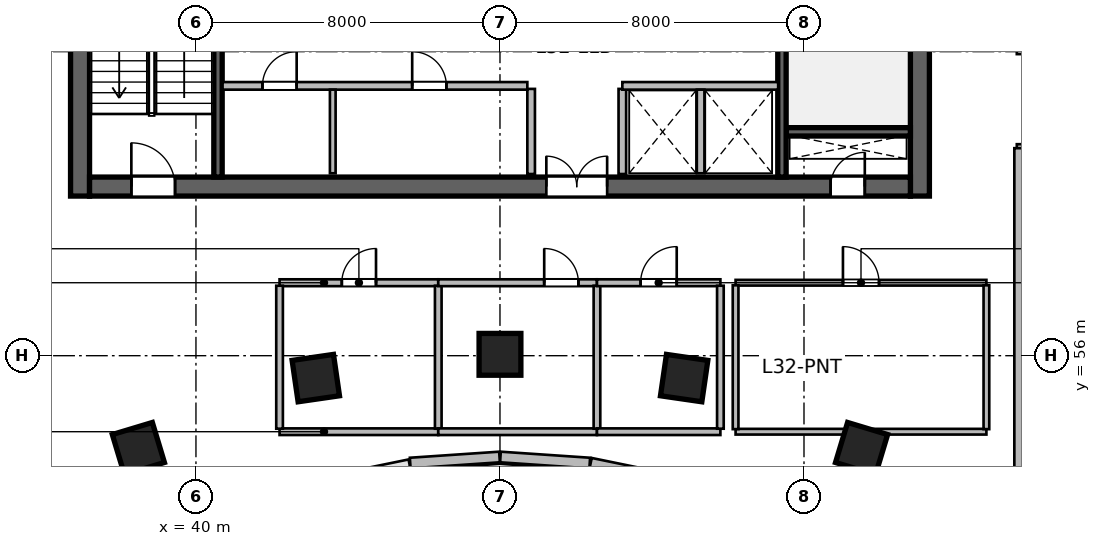
"""IFC4 building model, lengths in metres.
Left out: names, types, materials, properties, quantities, classifications, styles, units other than length and angle.
Written with IfcOpenShell. Run it as: python <this file> out.ifc"""

import sys

from ifc_helpers import new_model, si_unit, direction, frame, frame_2d, origin, origin_2d, place, context, subcontext, project, spatial, rectangle, extrude, source, transform, mapped, element, fill, save


model = new_model("IFC4")
c1 = context("Model", 3, precision=1e-05, world=origin(), true_north=direction((0.0, 1.0)))
c2 = subcontext(c1, "Body", "Model", "MODEL_VIEW")
j1 = project(units=[si_unit("LENGTHUNIT", "METRE"), si_unit("PLANEANGLEUNIT", "RADIAN")], contexts=[c1])
p1 = place(None, origin())
s1 = spatial("IfcSite", under=j1, at=p1, CompositionType="ELEMENT")
p2 = place(p1, origin())
s2 = spatial("IfcBuilding", under=s1, at=p2, CompositionType="ELEMENT")
p3 = place(p2, frame((0.0, 0.0, 135.0)))
s3 = spatial("IfcBuildingStorey", under=s2, at=p3, CompositionType="ELEMENT", Elevation=135.0)
m1 = source(origin(), c2, "Body", "SweptSolid", [
    extrude(rectangle(XDim=12.0, YDim=0.5, at=frame_2d((6.0, 0.0))), origin(), (0.0, 0.0, 1.0), 3.9),
])
for number, where, z_axis, x_axis in (
    (1, (36.95, 60.2, 0.0), (0.0, 0.0, 1.0), (0.0, 1.0, 0.0)),
    (2, (59.05, 60.2, 0.0), (0.0, 0.0, 1.0), (0.0, 1.0, 0.0)),
):
    element("IfcWall", number, at=place(p3, frame(where, z_axis=z_axis, x_axis=x_axis)), inside=s3, PredefinedType="SHEAR", context=c2, shape_type="MappedRepresentation", body=[
        mapped(m1, transform((0.0, 0.0, 0.0), scale=1.0)),
    ])
m2 = source(origin(), c2, "Body", "SweptSolid", [
    extrude(rectangle(XDim=21.6, YDim=0.5, at=frame_2d((10.8, 0.0))), origin(), (0.0, 0.0, 1.0), 3.9),
])
p4 = place(p3, frame((37.2, 60.45, 0.0), z_axis=(0.0, 0.0, 1.0), x_axis=(1.0, 0.0, 0.0)))
e3 = element("IfcWall", 3, at=p4, inside=s3, PredefinedType="SHEAR", context=c2, shape_type="MappedRepresentation", body=[
    mapped(m2, transform((0.0, 0.0, 0.0), scale=1.0)),
])
p5 = place(p4, frame((1.1, 0.0, 0.0)))
e4 = element("IfcOpeningElement", 4, at=p5, cuts=e3, PredefinedType="OPENING", context=c2, shape_type="SweptSolid", body=[
    extrude(rectangle(XDim=1.15, YDim=2.15, at=frame_2d((0.575, 1.075))), frame((0.0, 0.26, 0.0), z_axis=(0.0, -1.0, 0.0), x_axis=(1.0, 0.0, 0.0)), (0.0, 0.0, 1.0), 0.52),
])
p6 = place(p4, frame((19.5, 0.0, 0.0)))
e5 = element("IfcOpeningElement", 5, at=p6, cuts=e3, PredefinedType="OPENING", context=c2, shape_type="SweptSolid", body=[
    extrude(rectangle(XDim=0.9, YDim=2.1, at=frame_2d((0.45, 1.05))), frame((0.0, 0.26, 0.0), z_axis=(0.0, -1.0, 0.0), x_axis=(1.0, 0.0, 0.0)), (0.0, 0.0, 1.0), 0.52),
])
p7 = place(p4, frame((12.02, 0.0, 0.0)))
e6 = element("IfcOpeningElement", 6, at=p7, cuts=e3, PredefinedType="OPENING", context=c2, shape_type="SweptSolid", body=[
    extrude(rectangle(XDim=1.6, YDim=2.15, at=frame_2d((0.8, 1.075))), frame((0.0, 0.26, 0.0), z_axis=(0.0, -1.0, 0.0), x_axis=(1.0, 0.0, 0.0)), (0.0, 0.0, 1.0), 0.52),
])
m3 = source(origin(), c2, "Body", "SweptSolid", [
    extrude(rectangle(XDim=3.27, YDim=0.22, at=frame_2d((1.635, 0.0))), origin(), (0.0, 0.0, 1.0), 3.9),
])
p8 = place(p3, frame((55.53, 61.89, 0.0), z_axis=(0.0, 0.0, 1.0), x_axis=(1.0, 0.0, 0.0)))
e7 = element("IfcWall", 7, at=p8, inside=s3, PredefinedType="SHEAR", context=c2, shape_type="MappedRepresentation", body=[
    mapped(m3, transform((0.0, 0.0, 0.0), scale=1.0)),
])
m4 = source(origin(), c2, "Body", "SweptSolid", [
    extrude(rectangle(XDim=11.0, YDim=0.22, at=frame_2d((5.5, 0.0))), origin(), (0.0, 0.0, 1.0), 3.9),
])
p9 = place(p3, frame((40.58, 60.7, 0.0), z_axis=(0.0, 0.0, 1.0), x_axis=(0.0, 1.0, 0.0)))
e8 = element("IfcWall", 8, at=p9, inside=s3, PredefinedType="SHEAR", context=c2, shape_type="MappedRepresentation", body=[
    mapped(m4, transform((0.0, 0.0, 0.0), scale=1.0)),
])
p10 = place(p3, frame((55.42, 60.7, 0.0), z_axis=(0.0, 0.0, 1.0), x_axis=(0.0, 1.0, 0.0)))
e9 = element("IfcWall", 9, at=p10, inside=s3, PredefinedType="SHEAR", context=c2, shape_type="MappedRepresentation", body=[
    mapped(m4, transform((0.0, 0.0, 0.0), scale=1.0)),
])
p11 = place(p10, frame((9.545, 0.0, 0.0)))
e10 = element("IfcOpeningElement", 10, at=p11, cuts=e9, PredefinedType="OPENING", context=c2, shape_type="SweptSolid", body=[
    extrude(rectangle(XDim=1.15, YDim=2.15, at=frame_2d((0.575, 1.075))), frame((0.0, 0.12, 0.0), z_axis=(0.0, -1.0, 0.0), x_axis=(1.0, 0.0, 0.0)), (0.0, 0.0, 1.0), 0.24),
])
m5 = source(origin(), c2, "Body", "SweptSolid", [
    extrude(rectangle(XDim=1.1, YDim=1.1, at=origin_2d()), origin(), (0.0, 0.0, 1.0), 3.9),
])
for number, where, z_axis, x_axis in (
    (11, (38.485, 53.558, 0.0), (0.0, 0.0, 1.0), (-0.289, 0.957, 0.0)),
    (12, (43.154, 55.411, 0.0), (0.0, 0.0, 1.0), (-0.143, 0.99, 0.0)),
    (13, (48.0, 56.036, 0.0), (0.0, 0.0, 1.0), (0.0, 1.0, 0.0)),
    (14, (52.846, 55.411, 0.0), (0.0, 0.0, 1.0), (0.143, 0.99, 0.0)),
    (15, (57.515, 53.558, 0.0), (0.0, 0.0, 1.0), (0.289, 0.957, 0.0)),
):
    element("IfcColumn", number, at=place(p3, frame(where, z_axis=z_axis, x_axis=x_axis)), inside=s3, PredefinedType="COLUMN", context=c2, shape_type="MappedRepresentation", body=[
        mapped(m5, transform((0.0, 0.0, 0.0), scale=1.0)),
    ])
m6 = source(origin(), c2, "Body", "SweptSolid", [
    extrude(rectangle(XDim=2.374, YDim=0.28, at=frame_2d((1.187, 0.0))), origin(), (0.0, 0.0, 1.0), 3.65),
])
p12 = place(p3, frame((52.711, 52.695, 0.0), z_axis=(0.0, 0.0, 1.0), x_axis=(-0.979619827472, 0.200860632341, 0.0)))
e16 = element("IfcWall", 16, at=p12, inside=s3, PredefinedType="SOLIDWALL", context=c2, shape_type="MappedRepresentation", body=[
    mapped(m6, transform((0.0, 0.0, 0.0), scale=1.0)),
])
m7 = source(origin(), c2, "Body", "SweptSolid", [
    extrude(rectangle(XDim=2.355, YDim=0.28, at=frame_2d((1.177, 0.0))), origin(), (0.0, 0.0, 1.0), 3.65),
])
for number, where, z_axis, x_axis in (
    (17, (50.362, 53.175, 0.0), (0.0, 0.0, 1.0), (-0.998, 0.068, 0.0)),
    (18, (47.988, 53.335, 0.0), (0.0, 0.0, 1.0), (-0.998, -0.068, 0.0)),
):
    element("IfcWall", number, at=place(p3, frame(where, z_axis=z_axis, x_axis=x_axis)), inside=s3, PredefinedType="SOLIDWALL", context=c2, shape_type="MappedRepresentation", body=[
        mapped(m7, transform((0.0, 0.0, 0.0), scale=1.0)),
    ])
m8 = source(origin(), c2, "Body", "SweptSolid", [
    extrude(rectangle(XDim=2.24, YDim=0.2, at=frame_2d((1.12, 0.0))), origin(), (0.0, 0.0, 1.0), 3.65),
])
for number, where, z_axis, x_axis in (
    (19, (48.82, 60.78, 0.0), (0.0, 0.0, 1.0), (0.0, 1.0, 0.0)),
    (20, (51.22, 60.78, 0.0), (0.0, 0.0, 1.0), (0.0, 1.0, 0.0)),
):
    element("IfcWall", number, at=place(p3, frame(where, z_axis=z_axis, x_axis=x_axis)), inside=s3, PredefinedType="SOLIDWALL", context=c2, shape_type="MappedRepresentation", body=[
        mapped(m8, transform((0.0, 0.0, 0.0), scale=1.0)),
    ])
m9 = source(origin(), c2, "Body", "SweptSolid", [
    extrude(rectangle(XDim=8.02, YDim=0.2, at=frame_2d((4.01, 0.0))), origin(), (0.0, 0.0, 1.0), 3.65),
])
p13 = place(p3, frame((40.7, 63.1, 0.0), z_axis=(0.0, 0.0, 1.0), x_axis=(1.0, 0.0, 0.0)))
e21 = element("IfcWall", 21, at=p13, inside=s3, PredefinedType="SOLIDWALL", context=c2, shape_type="MappedRepresentation", body=[
    mapped(m9, transform((0.0, 0.0, 0.0), scale=1.0)),
])
p14 = place(p13, frame((1.05, 0.0, 0.0)))
e22 = element("IfcOpeningElement", 22, at=p14, cuts=e21, PredefinedType="OPENING", context=c2, shape_type="SweptSolid", body=[
    extrude(rectangle(XDim=0.9, YDim=2.1, at=frame_2d((0.45, 1.05))), frame((0.0, 0.11, 0.0), z_axis=(0.0, -1.0, 0.0), x_axis=(1.0, 0.0, 0.0)), (0.0, 0.0, 1.0), 0.22),
])
p15 = place(p13, frame((4.99, 0.0, 0.0)))
e23 = element("IfcOpeningElement", 23, at=p15, cuts=e21, PredefinedType="OPENING", context=c2, shape_type="SweptSolid", body=[
    extrude(rectangle(XDim=0.9, YDim=2.1, at=frame_2d((0.45, 1.05))), frame((0.0, 0.11, 0.0), z_axis=(0.0, -1.0, 0.0), x_axis=(1.0, 0.0, 0.0)), (0.0, 0.0, 1.0), 0.22),
])
m10 = source(origin(), c2, "Body", "SweptSolid", [
    extrude(rectangle(XDim=4.1, YDim=0.2, at=frame_2d((2.05, 0.0))), origin(), (0.0, 0.0, 1.0), 3.65),
])
p16 = place(p3, frame((51.22, 63.1, 0.0), z_axis=(0.0, 0.0, 1.0), x_axis=(1.0, 0.0, 0.0)))
e24 = element("IfcWall", 24, at=p16, inside=s3, PredefinedType="SOLIDWALL", context=c2, shape_type="MappedRepresentation", body=[
    mapped(m10, transform((0.0, 0.0, 0.0), scale=1.0)),
])
m11 = source(origin(), c2, "Body", "SweptSolid", [
    extrude(rectangle(XDim=2.2, YDim=0.15, at=frame_2d((1.1, 0.0))), origin(), (0.0, 0.0, 1.0), 3.65),
])
p17 = place(p3, frame((43.6, 60.8, 0.0), z_axis=(0.0, 0.0, 1.0), x_axis=(0.0, 1.0, 0.0)))
e25 = element("IfcWall", 25, at=p17, inside=s3, PredefinedType="PARTITIONING", context=c2, shape_type="MappedRepresentation", body=[
    mapped(m11, transform((0.0, 0.0, 0.0), scale=1.0)),
])
m12 = source(origin(), c2, "Body", "SweptSolid", [
    extrude(rectangle(XDim=2.2, YDim=0.2, at=frame_2d((1.1, 0.0))), origin(), (0.0, 0.0, 1.0), 3.65),
])
p18 = place(p3, frame((53.28, 60.8, 0.0), z_axis=(0.0, 0.0, 1.0), x_axis=(0.0, 1.0, 0.0)))
e26 = element("IfcWall", 26, at=p18, inside=s3, PredefinedType="SOLIDWALL", context=c2, shape_type="MappedRepresentation", body=[
    mapped(m12, transform((0.0, 0.0, 0.0), scale=1.0)),
])
m13 = source(origin(), c2, "Body", "SweptSolid", [
    extrude(rectangle(XDim=4.176, YDim=0.175, at=frame_2d((2.088, 0.0))), origin(), (0.0, 0.0, 1.0), 3.65),
])
p19 = place(p3, frame((42.2, 54.0, 0.0), z_axis=(0.0, 0.0, 1.0), x_axis=(1.0, 0.0, 0.0)))
e27 = element("IfcWall", 27, at=p19, inside=s3, PredefinedType="PARTITIONING", context=c2, shape_type="MappedRepresentation", body=[
    mapped(m13, transform((0.0, 0.0, 0.0), scale=1.0)),
])
m14 = source(origin(), c2, "Body", "SweptSolid", [
    extrude(rectangle(XDim=4.176, YDim=0.18, at=frame_2d((2.088, 0.0))), origin(), (0.0, 0.0, 1.0), 3.65),
])
p20 = place(p3, frame((42.2, 57.92, 0.0), z_axis=(0.0, 0.0, 1.0), x_axis=(1.0, 0.0, 0.0)))
e28 = element("IfcWall", 28, at=p20, inside=s3, PredefinedType="PLUMBINGWALL", context=c2, shape_type="MappedRepresentation", body=[
    mapped(m14, transform((0.0, 0.0, 0.0), scale=1.0)),
])
p21 = place(p20, frame((1.638, 0.0, 0.0)))
e29 = element("IfcOpeningElement", 29, at=p21, cuts=e28, PredefinedType="OPENING", context=c2, shape_type="SweptSolid", body=[
    extrude(rectangle(XDim=0.9, YDim=2.08, at=frame_2d((0.45, 1.04))), frame((0.0, 0.1, 0.0), z_axis=(0.0, -1.0, 0.0), x_axis=(1.0, 0.0, 0.0)), (0.0, 0.0, 1.0), 0.2),
])
m15 = source(origin(), c2, "Body", "SweptSolid", [
    extrude(rectangle(XDim=3.763, YDim=0.175, at=frame_2d((1.881, 0.0))), origin(), (0.0, 0.0, 1.0), 3.65),
])
for number, where, z_axis, x_axis in (
    (30, (42.2, 54.079, 0.0), (0.0, 0.0, 1.0), (0.0, 1.0, 0.0)),
    (31, (46.376, 54.079, 0.0), (0.0, 0.0, 1.0), (0.0, 1.0, 0.0)),
):
    element("IfcWall", number, at=place(p3, frame(where, z_axis=z_axis, x_axis=x_axis)), inside=s3, PredefinedType="PARTITIONING", context=c2, shape_type="MappedRepresentation", body=[
        mapped(m15, transform((0.0, 0.0, 0.0), scale=1.0)),
    ])
p22 = place(p3, frame((46.376, 54.0, 0.0), z_axis=(0.0, 0.0, 1.0), x_axis=(1.0, 0.0, 0.0)))
e32 = element("IfcWall", 32, at=p22, inside=s3, PredefinedType="PARTITIONING", context=c2, shape_type="MappedRepresentation", body=[
    mapped(m13, transform((0.0, 0.0, 0.0), scale=1.0)),
])
p23 = place(p3, frame((46.376, 57.92, 0.0), z_axis=(0.0, 0.0, 1.0), x_axis=(1.0, 0.0, 0.0)))
e33 = element("IfcWall", 33, at=p23, inside=s3, PredefinedType="PLUMBINGWALL", context=c2, shape_type="MappedRepresentation", body=[
    mapped(m14, transform((0.0, 0.0, 0.0), scale=1.0)),
])
p24 = place(p23, frame((2.788, 0.0, 0.0)))
e34 = element("IfcOpeningElement", 34, at=p24, cuts=e33, PredefinedType="OPENING", context=c2, shape_type="SweptSolid", body=[
    extrude(rectangle(XDim=0.9, YDim=2.08, at=frame_2d((0.45, 1.04))), frame((0.0, 0.1, 0.0), z_axis=(0.0, -1.0, 0.0), x_axis=(1.0, 0.0, 0.0)), (0.0, 0.0, 1.0), 0.2),
])
p25 = place(p3, frame((50.552, 54.079, 0.0), z_axis=(0.0, 0.0, 1.0), x_axis=(0.0, 1.0, 0.0)))
e35 = element("IfcWall", 35, at=p25, inside=s3, PredefinedType="PARTITIONING", context=c2, shape_type="MappedRepresentation", body=[
    mapped(m15, transform((0.0, 0.0, 0.0), scale=1.0)),
])
m16 = source(origin(), c2, "Body", "SweptSolid", [
    extrude(rectangle(XDim=3.248, YDim=0.175, at=frame_2d((1.624, 0.0))), origin(), (0.0, 0.0, 1.0), 3.65),
])
p26 = place(p3, frame((50.552, 54.0, 0.0), z_axis=(0.0, 0.0, 1.0), x_axis=(1.0, 0.0, 0.0)))
e36 = element("IfcWall", 36, at=p26, inside=s3, PredefinedType="PARTITIONING", context=c2, shape_type="MappedRepresentation", body=[
    mapped(m16, transform((0.0, 0.0, 0.0), scale=1.0)),
])
m17 = source(origin(), c2, "Body", "SweptSolid", [
    extrude(rectangle(XDim=3.248, YDim=0.18, at=frame_2d((1.624, 0.0))), origin(), (0.0, 0.0, 1.0), 3.65),
])
p27 = place(p3, frame((50.552, 57.92, 0.0), z_axis=(0.0, 0.0, 1.0), x_axis=(1.0, 0.0, 0.0)))
e37 = element("IfcWall", 37, at=p27, inside=s3, PredefinedType="PLUMBINGWALL", context=c2, shape_type="MappedRepresentation", body=[
    mapped(m17, transform((0.0, 0.0, 0.0), scale=1.0)),
])
p28 = place(p27, frame((1.149, 0.0, 0.0)))
e38 = element("IfcOpeningElement", 38, at=p28, cuts=e37, PredefinedType="OPENING", context=c2, shape_type="SweptSolid", body=[
    extrude(rectangle(XDim=0.95, YDim=2.12, at=frame_2d((0.475, 1.06))), frame((0.0, 0.1, 0.0), z_axis=(0.0, -1.0, 0.0), x_axis=(1.0, 0.0, 0.0)), (0.0, 0.0, 1.0), 0.2),
])
p29 = place(p3, frame((53.8, 54.079, 0.0), z_axis=(0.0, 0.0, 1.0), x_axis=(0.0, 1.0, 0.0)))
e39 = element("IfcWall", 39, at=p29, inside=s3, PredefinedType="PARTITIONING", context=c2, shape_type="MappedRepresentation", body=[
    mapped(m15, transform((0.0, 0.0, 0.0), scale=1.0)),
])
m18 = source(origin(), c2, "Body", "SweptSolid", [
    extrude(rectangle(XDim=6.6, YDim=0.15, at=frame_2d((3.3, 0.0))), origin(), (0.0, 0.0, 1.0), 3.095),
])
p30 = place(p3, frame((54.2, 54.0, 0.0), z_axis=(0.0, 0.0, 1.0), x_axis=(1.0, 0.0, 0.0)))
e40 = element("IfcWall", 40, at=p30, inside=s3, PredefinedType="PARTITIONING", context=c2, shape_type="MappedRepresentation", body=[
    mapped(m18, transform((0.0, 0.0, 0.0), scale=1.0)),
])
m19 = source(origin(), c2, "Body", "SweptSolid", [
    extrude(rectangle(XDim=6.6, YDim=0.15, at=frame_2d((3.3, 0.0))), origin(), (0.0, 0.0, 1.0), 3.65),
])
p31 = place(p3, frame((54.2, 57.92, 0.0), z_axis=(0.0, 0.0, 1.0), x_axis=(1.0, 0.0, 0.0)))
e41 = element("IfcWall", 41, at=p31, inside=s3, PredefinedType="PARTITIONING", context=c2, shape_type="MappedRepresentation", body=[
    mapped(m19, transform((0.0, 0.0, 0.0), scale=1.0)),
])
p32 = place(p31, frame((2.825, 0.0, 0.0)))
e42 = element("IfcOpeningElement", 42, at=p32, cuts=e41, PredefinedType="OPENING", context=c2, shape_type="SweptSolid", body=[
    extrude(rectangle(XDim=0.95, YDim=2.1, at=frame_2d((0.475, 1.05))), frame((0.0, 0.085, 0.0), z_axis=(0.0, -1.0, 0.0), x_axis=(1.0, 0.0, 0.0)), (0.0, 0.0, 1.0), 0.17),
])
m20 = source(origin(), c2, "Body", "SweptSolid", [
    extrude(rectangle(XDim=3.785, YDim=0.15, at=frame_2d((1.893, 0.0))), origin(), (0.0, 0.0, 1.0), 3.65),
])
for number, where, z_axis, x_axis in (
    (43, (54.2, 54.067, 0.0), (0.0, 0.0, 1.0), (0.0, 1.0, 0.0)),
    (44, (60.8, 54.067, 0.0), (0.0, 0.0, 1.0), (0.0, 1.0, 0.0)),
):
    element("IfcWall", number, at=place(p3, frame(where, z_axis=z_axis, x_axis=x_axis)), inside=s3, PredefinedType="PARTITIONING", context=c2, shape_type="MappedRepresentation", body=[
        mapped(m20, transform((0.0, 0.0, 0.0), scale=1.0)),
    ])
m21 = source(origin(), c2, "Body", "SweptSolid", [
    extrude(rectangle(XDim=4.2, YDim=0.21, at=frame_2d((2.1, 0.0))), origin(), (0.0, 0.0, 1.0), 3.65),
])
p33 = place(p3, frame((61.6, 64.04, 0.0), z_axis=(0.0, 0.0, 1.0), x_axis=(1.0, 0.0, 0.0)))
e45 = element("IfcWall", 45, at=p33, inside=s3, PredefinedType="PARTITIONING", context=c2, shape_type="MappedRepresentation", body=[
    mapped(m21, transform((0.0, 0.0, 0.0), scale=1.0)),
])
p34 = place(p33, frame((1.625, 0.0, 0.0)))
e46 = element("IfcOpeningElement", 46, at=p34, cuts=e45, PredefinedType="OPENING", context=c2, shape_type="SweptSolid", body=[
    extrude(rectangle(XDim=0.95, YDim=2.1, at=frame_2d((0.475, 1.05))), frame((0.0, 0.115, 0.0), z_axis=(0.0, -1.0, 0.0), x_axis=(1.0, 0.0, 0.0)), (0.0, 0.0, 1.0), 0.23),
])
p35 = place(p3, frame((61.6, 61.46, 0.0), z_axis=(0.0, 0.0, 1.0), x_axis=(1.0, 0.0, 0.0)))
e47 = element("IfcWall", 47, at=p35, inside=s3, PredefinedType="PARTITIONING", context=c2, shape_type="MappedRepresentation", body=[
    mapped(m21, transform((0.0, 0.0, 0.0), scale=1.0)),
])
p36 = place(p35, frame((1.625, 0.0, 0.0)))
e48 = element("IfcOpeningElement", 48, at=p36, cuts=e47, PredefinedType="OPENING", context=c2, shape_type="SweptSolid", body=[
    extrude(rectangle(XDim=0.95, YDim=2.1, at=frame_2d((0.475, 1.05))), frame((0.0, 0.115, 0.0), z_axis=(0.0, -1.0, 0.0), x_axis=(1.0, 0.0, 0.0)), (0.0, 0.0, 1.0), 0.23),
])
m22 = source(origin(), c2, "Body", "SweptSolid", [
    extrude(rectangle(XDim=13.988, YDim=0.21, at=frame_2d((6.994, 0.0))), origin(), (0.0, 0.0, 1.0), 2.942),
])
p37 = place(p3, frame((61.64, 47.472, 0.0), z_axis=(0.0, 0.0, 1.0), x_axis=(0.0, 1.0, 0.0)))
e49 = element("IfcWall", 49, at=p37, inside=s3, PredefinedType="PARTITIONING", context=c2, shape_type="MappedRepresentation", body=[
    mapped(m22, transform((0.0, 0.0, 0.0), scale=1.0)),
])
m23 = source(origin(), c2, "Body", "SweptSolid", [
    extrude(rectangle(XDim=1.15, YDim=2.15, at=frame_2d((0.575, 1.075))), frame((0.0, 0.025, 0.0), z_axis=(0.0, -1.0, 0.0), x_axis=(1.0, 0.0, 0.0)), (0.0, 0.0, 1.0), 0.05),
])
p38 = place(p5, origin())
e50 = element("IfcDoor", 50, at=p38, inside=s3, OperationType="SINGLE_SWING_LEFT", PredefinedType="DOOR", context=c2, shape_type="MappedRepresentation", body=[
    mapped(m23, transform((0.0, 0.0, 0.0), scale=1.0)),
])
fill(e4, e50)
m24 = source(origin(), c2, "Body", "SweptSolid", [
    extrude(rectangle(XDim=0.9, YDim=2.1, at=frame_2d((0.45, 1.05))), frame((0.0, 0.025, 0.0), z_axis=(0.0, -1.0, 0.0), x_axis=(1.0, 0.0, 0.0)), (0.0, 0.0, 1.0), 0.05),
])
p39 = place(p6, origin())
e51 = element("IfcDoor", 51, at=p39, inside=s3, OperationType="SINGLE_SWING_RIGHT", PredefinedType="DOOR", context=c2, shape_type="MappedRepresentation", body=[
    mapped(m24, transform((0.0, 0.0, 0.0), scale=1.0)),
])
fill(e5, e51)
m25 = source(origin(), c2, "Body", "SweptSolid", [
    extrude(rectangle(XDim=1.6, YDim=2.15, at=frame_2d((0.8, 1.075))), frame((0.0, 0.025, 0.0), z_axis=(0.0, -1.0, 0.0), x_axis=(1.0, 0.0, 0.0)), (0.0, 0.0, 1.0), 0.05),
])
p40 = place(p7, origin())
e52 = element("IfcDoor", 52, at=p40, inside=s3, OperationType="DOUBLE_DOOR_SINGLE_SWING", PredefinedType="DOOR", context=c2, shape_type="MappedRepresentation", body=[
    mapped(m25, transform((0.0, 0.0, 0.0), scale=1.0)),
])
fill(e6, e52)
p41 = place(p14, origin())
e53 = element("IfcDoor", 53, at=p41, inside=s3, OperationType="SINGLE_SWING_RIGHT", PredefinedType="DOOR", context=c2, shape_type="MappedRepresentation", body=[
    mapped(m24, transform((0.0, 0.0, 0.0), scale=1.0)),
])
fill(e22, e53)
p42 = place(p15, origin())
e54 = element("IfcDoor", 54, at=p42, inside=s3, OperationType="SINGLE_SWING_LEFT", PredefinedType="DOOR", context=c2, shape_type="MappedRepresentation", body=[
    mapped(m24, transform((0.0, 0.0, 0.0), scale=1.0)),
])
fill(e23, e54)
m26 = source(origin(), c2, "Body", "SweptSolid", [
    extrude(rectangle(XDim=0.9, YDim=2.08, at=frame_2d((0.45, 1.04))), frame((0.0, 0.025, 0.0), z_axis=(0.0, -1.0, 0.0), x_axis=(1.0, 0.0, 0.0)), (0.0, 0.0, 1.0), 0.05),
])
p43 = place(p21, origin())
e55 = element("IfcDoor", 55, at=p43, inside=s3, OperationType="SINGLE_SWING_RIGHT", PredefinedType="DOOR", context=c2, shape_type="MappedRepresentation", body=[
    mapped(m26, transform((0.0, 0.0, 0.0), scale=1.0)),
])
fill(e29, e55)
p44 = place(p24, origin())
e56 = element("IfcDoor", 56, at=p44, inside=s3, OperationType="SINGLE_SWING_LEFT", PredefinedType="DOOR", context=c2, shape_type="MappedRepresentation", body=[
    mapped(m26, transform((0.0, 0.0, 0.0), scale=1.0)),
])
fill(e34, e56)
m27 = source(origin(), c2, "Body", "SweptSolid", [
    extrude(rectangle(XDim=0.95, YDim=2.12, at=frame_2d((0.475, 1.06))), frame((0.0, 0.025, 0.0), z_axis=(0.0, -1.0, 0.0), x_axis=(1.0, 0.0, 0.0)), (0.0, 0.0, 1.0), 0.05),
])
p45 = place(p28, origin())
e57 = element("IfcDoor", 57, at=p45, inside=s3, OperationType="SINGLE_SWING_RIGHT", PredefinedType="DOOR", context=c2, shape_type="MappedRepresentation", body=[
    mapped(m27, transform((0.0, 0.0, 0.0), scale=1.0)),
])
fill(e38, e57)
m28 = source(origin(), c2, "Body", "SweptSolid", [
    extrude(rectangle(XDim=0.95, YDim=2.1, at=frame_2d((0.475, 1.05))), frame((0.0, 0.025, 0.0), z_axis=(0.0, -1.0, 0.0), x_axis=(1.0, 0.0, 0.0)), (0.0, 0.0, 1.0), 0.05),
])
p46 = place(p32, origin())
e58 = element("IfcDoor", 58, at=p46, inside=s3, OperationType="SINGLE_SWING_LEFT", PredefinedType="DOOR", context=c2, shape_type="MappedRepresentation", body=[
    mapped(m28, transform((0.0, 0.0, 0.0), scale=1.0)),
])
fill(e42, e58)
save(model, sys.argv[1])
